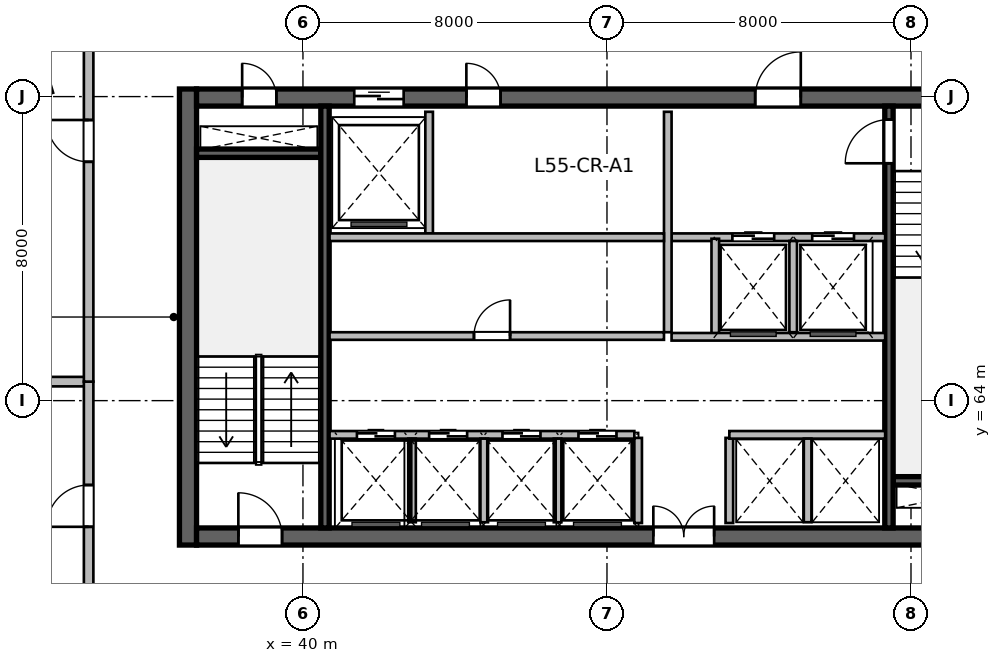
"""IFC4 building model, lengths in metres.
Left out: names, types, materials, properties, quantities, classifications, styles, units other than length and angle.
Written with IfcOpenShell. Run it as: python <this file> out.ifc"""

import sys

from ifc_helpers import new_model, si_unit, direction, frame, frame_2d, origin, place, context, subcontext, project, spatial, rectangle, extrude, source, transform, mapped, element, fill, save


model = new_model("IFC4")
c1 = context("Model", 3, precision=1e-05, world=origin(), true_north=direction((0.0, 1.0)))
c2 = subcontext(c1, "Body", "Model", "MODEL_VIEW")
j1 = project(units=[si_unit("LENGTHUNIT", "METRE"), si_unit("PLANEANGLEUNIT", "RADIAN")], contexts=[c1])
p1 = place(None, origin())
s1 = spatial("IfcSite", under=j1, at=p1, CompositionType="ELEMENT")
p2 = place(p1, origin())
s2 = spatial("IfcBuilding", under=s1, at=p2, CompositionType="ELEMENT")
p3 = place(p2, frame((0.0, 0.0, 227.4)))
s3 = spatial("IfcBuildingStorey", under=s2, at=p3, CompositionType="ELEMENT", Elevation=227.4)
m1 = source(origin(), c2, "Body", "SweptSolid", [
    extrude(rectangle(XDim=12.0, YDim=0.45, at=frame_2d((6.0, 0.0))), origin(), (0.0, 0.0, 1.0), 3.9),
])
p4 = place(p3, frame((36.975, 60.2, 0.0), z_axis=(0.0, 0.0, 1.0), x_axis=(0.0, 1.0, 0.0)))
e1 = element("IfcWall", 1, at=p4, inside=s3, PredefinedType="SHEAR", context=c2, shape_type="MappedRepresentation", body=[
    mapped(m1, transform((0.0, 0.0, 0.0), scale=1.0)),
])
m2 = source(origin(), c2, "Body", "SweptSolid", [
    extrude(rectangle(XDim=21.6, YDim=0.45, at=frame_2d((10.8, 0.0))), origin(), (0.0, 0.0, 1.0), 3.9),
])
p5 = place(p3, frame((37.2, 60.425, 0.0), z_axis=(0.0, 0.0, 1.0), x_axis=(1.0, 0.0, 0.0)))
e2 = element("IfcWall", 2, at=p5, inside=s3, PredefinedType="SHEAR", context=c2, shape_type="MappedRepresentation", body=[
    mapped(m2, transform((0.0, 0.0, 0.0), scale=1.0)),
])
p6 = place(p5, frame((1.1, 0.0, 0.0)))
e3 = element("IfcOpeningElement", 3, at=p6, cuts=e2, PredefinedType="OPENING", context=c2, shape_type="SweptSolid", body=[
    extrude(rectangle(XDim=1.15, YDim=2.15, at=frame_2d((0.575, 1.075))), frame((0.0, 0.235, 0.0), z_axis=(0.0, -1.0, 0.0), x_axis=(1.0, 0.0, 0.0)), (0.0, 0.0, 1.0), 0.47),
])
p7 = place(p5, frame((19.5, 0.0, 0.0)))
e4 = element("IfcOpeningElement", 4, at=p7, cuts=e2, PredefinedType="OPENING", context=c2, shape_type="SweptSolid", body=[
    extrude(rectangle(XDim=0.9, YDim=2.1, at=frame_2d((0.45, 1.05))), frame((0.0, 0.235, 0.0), z_axis=(0.0, -1.0, 0.0), x_axis=(1.0, 0.0, 0.0)), (0.0, 0.0, 1.0), 0.47),
])
p8 = place(p5, frame((12.02, 0.0, 0.0)))
e5 = element("IfcOpeningElement", 5, at=p8, cuts=e2, PredefinedType="OPENING", context=c2, shape_type="SweptSolid", body=[
    extrude(rectangle(XDim=1.6, YDim=2.15, at=frame_2d((0.8, 1.075))), frame((0.0, 0.235, 0.0), z_axis=(0.0, -1.0, 0.0), x_axis=(1.0, 0.0, 0.0)), (0.0, 0.0, 1.0), 0.47),
])
p9 = place(p3, frame((37.2, 71.975, 0.0), z_axis=(0.0, 0.0, 1.0), x_axis=(1.0, 0.0, 0.0)))
e6 = element("IfcWall", 6, at=p9, inside=s3, PredefinedType="SHEAR", context=c2, shape_type="MappedRepresentation", body=[
    mapped(m2, transform((0.0, 0.0, 0.0), scale=1.0)),
])
p10 = place(p9, frame((1.2, 0.0, 0.0)))
e7 = element("IfcOpeningElement", 7, at=p10, cuts=e6, PredefinedType="OPENING", context=c2, shape_type="SweptSolid", body=[
    extrude(rectangle(XDim=0.9, YDim=2.1, at=frame_2d((0.45, 1.05))), frame((0.0, 0.235, 0.0), z_axis=(0.0, -1.0, 0.0), x_axis=(1.0, 0.0, 0.0)), (0.0, 0.0, 1.0), 0.47),
])
p11 = place(p9, frame((14.7, 0.0, 0.0)))
e8 = element("IfcOpeningElement", 8, at=p11, cuts=e6, PredefinedType="OPENING", context=c2, shape_type="SweptSolid", body=[
    extrude(rectangle(XDim=1.2, YDim=2.15, at=frame_2d((0.6, 1.075))), frame((0.0, 0.235, 0.0), z_axis=(0.0, -1.0, 0.0), x_axis=(1.0, 0.0, 0.0)), (0.0, 0.0, 1.0), 0.47),
])
p12 = place(p9, frame((4.15, 0.0, 0.0)))
e9 = element("IfcOpeningElement", 9, at=p12, cuts=e6, PredefinedType="OPENING", context=c2, shape_type="SweptSolid", body=[
    extrude(rectangle(XDim=1.3, YDim=2.15, at=frame_2d((0.65, 1.075))), frame((0.0, 0.235, 0.0), z_axis=(0.0, -1.0, 0.0), x_axis=(1.0, 0.0, 0.0)), (0.0, 0.0, 1.0), 0.47),
])
p13 = place(p9, frame((7.1, 0.0, 0.0)))
e10 = element("IfcOpeningElement", 10, at=p13, cuts=e6, PredefinedType="OPENING", context=c2, shape_type="SweptSolid", body=[
    extrude(rectangle(XDim=0.9, YDim=2.1, at=frame_2d((0.45, 1.05))), frame((0.0, 0.235, 0.0), z_axis=(0.0, -1.0, 0.0), x_axis=(1.0, 0.0, 0.0)), (0.0, 0.0, 1.0), 0.47),
])
m3 = source(origin(), c2, "Body", "SweptSolid", [
    extrude(rectangle(XDim=3.27, YDim=0.22, at=frame_2d((1.635, 0.0))), origin(), (0.0, 0.0, 1.0), 3.9),
])
for number, where, z_axis, x_axis in (
    (11, (37.2, 70.51, 0.0), (0.0, 0.0, 1.0), (1.0, 0.0, 0.0)),
    (12, (55.53, 61.89, 0.0), (0.0, 0.0, 1.0), (1.0, 0.0, 0.0)),
):
    element("IfcWall", number, at=place(p3, frame(where, z_axis=z_axis, x_axis=x_axis)), inside=s3, PredefinedType="SHEAR", context=c2, shape_type="MappedRepresentation", body=[
        mapped(m3, transform((0.0, 0.0, 0.0), scale=1.0)),
    ])
m4 = source(origin(), c2, "Body", "SweptSolid", [
    extrude(rectangle(XDim=11.1, YDim=0.22, at=frame_2d((5.55, 0.0))), origin(), (0.0, 0.0, 1.0), 3.9),
])
p14 = place(p3, frame((40.58, 60.65, 0.0), z_axis=(0.0, 0.0, 1.0), x_axis=(0.0, 1.0, 0.0)))
e13 = element("IfcWall", 13, at=p14, inside=s3, PredefinedType="SHEAR", context=c2, shape_type="MappedRepresentation", body=[
    mapped(m4, transform((0.0, 0.0, 0.0), scale=1.0)),
])
p15 = place(p3, frame((55.42, 60.65, 0.0), z_axis=(0.0, 0.0, 1.0), x_axis=(0.0, 1.0, 0.0)))
e14 = element("IfcWall", 14, at=p15, inside=s3, PredefinedType="SHEAR", context=c2, shape_type="MappedRepresentation", body=[
    mapped(m4, transform((0.0, 0.0, 0.0), scale=1.0)),
])
p16 = place(p15, frame((9.595, 0.0, 0.0)))
e15 = element("IfcOpeningElement", 15, at=p16, cuts=e14, PredefinedType="OPENING", context=c2, shape_type="SweptSolid", body=[
    extrude(rectangle(XDim=1.15, YDim=2.15, at=frame_2d((0.575, 1.075))), frame((0.0, 0.12, 0.0), z_axis=(0.0, -1.0, 0.0), x_axis=(1.0, 0.0, 0.0)), (0.0, 0.0, 1.0), 0.24),
])
m5 = source(origin(), c2, "Body", "SweptSolid", [
    extrude(rectangle(XDim=2.24, YDim=0.2, at=frame_2d((1.12, 0.0))), origin(), (0.0, 0.0, 1.0), 3.65),
])
for number, where, z_axis, x_axis in (
    (16, (48.82, 60.78, 0.0), (0.0, 0.0, 1.0), (0.0, 1.0, 0.0)),
    (17, (51.22, 60.78, 0.0), (0.0, 0.0, 1.0), (0.0, 1.0, 0.0)),
):
    element("IfcWall", number, at=place(p3, frame(where, z_axis=z_axis, x_axis=x_axis)), inside=s3, PredefinedType="SOLIDWALL", context=c2, shape_type="MappedRepresentation", body=[
        mapped(m5, transform((0.0, 0.0, 0.0), scale=1.0)),
    ])
m6 = source(origin(), c2, "Body", "SweptSolid", [
    extrude(rectangle(XDim=5.62, YDim=0.2, at=frame_2d((2.81, 0.0))), origin(), (0.0, 0.0, 1.0), 3.65),
])
p17 = place(p3, frame((49.7, 68.3, 0.0), z_axis=(0.0, 0.0, 1.0), x_axis=(1.0, 0.0, 0.0)))
e18 = element("IfcWall", 18, at=p17, inside=s3, PredefinedType="SOLIDWALL", context=c2, shape_type="MappedRepresentation", body=[
    mapped(m6, transform((0.0, 0.0, 0.0), scale=1.0)),
])
p18 = place(p17, frame((1.6, 0.0, 0.0)))
e19 = element("IfcOpeningElement", 19, at=p18, cuts=e18, PredefinedType="OPENING", context=c2, shape_type="SweptSolid", body=[
    extrude(rectangle(XDim=1.1, YDim=2.15, at=frame_2d((0.55, 1.075))), frame((0.0, 0.11, 0.0), z_axis=(0.0, -1.0, 0.0), x_axis=(1.0, 0.0, 0.0)), (0.0, 0.0, 1.0), 0.22),
])
p19 = place(p17, frame((3.7, 0.0, 0.0)))
e20 = element("IfcOpeningElement", 20, at=p19, cuts=e18, PredefinedType="OPENING", context=c2, shape_type="SweptSolid", body=[
    extrude(rectangle(XDim=1.1, YDim=2.15, at=frame_2d((0.55, 1.075))), frame((0.0, 0.11, 0.0), z_axis=(0.0, -1.0, 0.0), x_axis=(1.0, 0.0, 0.0)), (0.0, 0.0, 1.0), 0.22),
])
m7 = source(origin(), c2, "Body", "SweptSolid", [
    extrude(rectangle(XDim=5.8, YDim=0.2, at=frame_2d((2.9, 0.0))), origin(), (0.0, 0.0, 1.0), 3.65),
])
p20 = place(p3, frame((49.6, 65.8, 0.0), z_axis=(0.0, 0.0, 1.0), x_axis=(0.0, 1.0, 0.0)))
e21 = element("IfcWall", 21, at=p20, inside=s3, PredefinedType="SOLIDWALL", context=c2, shape_type="MappedRepresentation", body=[
    mapped(m7, transform((0.0, 0.0, 0.0), scale=1.0)),
])
m8 = source(origin(), c2, "Body", "SweptSolid", [
    extrude(rectangle(XDim=2.58, YDim=0.2, at=frame_2d((1.29, 0.0))), origin(), (0.0, 0.0, 1.0), 3.65),
])
p21 = place(p3, frame((50.85, 65.68, 0.0), z_axis=(0.0, 0.0, 1.0), x_axis=(0.0, 1.0, 0.0)))
e22 = element("IfcWall", 22, at=p21, inside=s3, PredefinedType="SOLIDWALL", context=c2, shape_type="MappedRepresentation", body=[
    mapped(m8, transform((0.0, 0.0, 0.0), scale=1.0)),
])
m9 = source(origin(), c2, "Body", "SweptSolid", [
    extrude(rectangle(XDim=2.4, YDim=0.2, at=frame_2d((1.2, 0.0))), origin(), (0.0, 0.0, 1.0), 3.65),
])
p22 = place(p3, frame((52.9, 65.8, 0.0), z_axis=(0.0, 0.0, 1.0), x_axis=(0.0, 1.0, 0.0)))
e23 = element("IfcWall", 23, at=p22, inside=s3, PredefinedType="SOLIDWALL", context=c2, shape_type="MappedRepresentation", body=[
    mapped(m9, transform((0.0, 0.0, 0.0), scale=1.0)),
])
p23 = place(p3, frame((49.7, 65.68, 0.0), z_axis=(0.0, 0.0, 1.0), x_axis=(1.0, 0.0, 0.0)))
e24 = element("IfcWall", 24, at=p23, inside=s3, PredefinedType="SOLIDWALL", context=c2, shape_type="MappedRepresentation", body=[
    mapped(m6, transform((0.0, 0.0, 0.0), scale=1.0)),
])
m10 = source(origin(), c2, "Body", "SweptSolid", [
    extrude(rectangle(XDim=3.2, YDim=0.2, at=frame_2d((1.6, 0.0))), origin(), (0.0, 0.0, 1.0), 3.65),
])
p24 = place(p3, frame((43.32, 68.4, 0.0), z_axis=(0.0, 0.0, 1.0), x_axis=(0.0, 1.0, 0.0)))
e25 = element("IfcWall", 25, at=p24, inside=s3, PredefinedType="SOLIDWALL", context=c2, shape_type="MappedRepresentation", body=[
    mapped(m10, transform((0.0, 0.0, 0.0), scale=1.0)),
])
m11 = source(origin(), c2, "Body", "SweptSolid", [
    extrude(rectangle(XDim=8.8, YDim=0.2, at=frame_2d((4.4, 0.0))), origin(), (0.0, 0.0, 1.0), 3.65),
])
p25 = place(p3, frame((40.7, 68.3, 0.0), z_axis=(0.0, 0.0, 1.0), x_axis=(1.0, 0.0, 0.0)))
e26 = element("IfcWall", 26, at=p25, inside=s3, PredefinedType="SOLIDWALL", context=c2, shape_type="MappedRepresentation", body=[
    mapped(m11, transform((0.0, 0.0, 0.0), scale=1.0)),
])
m12 = source(origin(), c2, "Body", "SweptSolid", [
    extrude(rectangle(XDim=8.02, YDim=0.2, at=frame_2d((4.01, 0.0))), origin(), (0.0, 0.0, 1.0), 3.65),
])
p26 = place(p3, frame((40.7, 63.1, 0.0), z_axis=(0.0, 0.0, 1.0), x_axis=(1.0, 0.0, 0.0)))
e27 = element("IfcWall", 27, at=p26, inside=s3, PredefinedType="SOLIDWALL", context=c2, shape_type="MappedRepresentation", body=[
    mapped(m12, transform((0.0, 0.0, 0.0), scale=1.0)),
])
p27 = place(p26, frame((0.72, 0.0, 0.0)))
e28 = element("IfcOpeningElement", 28, at=p27, cuts=e27, PredefinedType="OPENING", context=c2, shape_type="SweptSolid", body=[
    extrude(rectangle(XDim=1.0, YDim=2.15, at=frame_2d((0.5, 1.075))), frame((0.0, 0.11, 0.0), z_axis=(0.0, -1.0, 0.0), x_axis=(1.0, 0.0, 0.0)), (0.0, 0.0, 1.0), 0.22),
])
p28 = place(p26, frame((2.62, 0.0, 0.0)))
e29 = element("IfcOpeningElement", 29, at=p28, cuts=e27, PredefinedType="OPENING", context=c2, shape_type="SweptSolid", body=[
    extrude(rectangle(XDim=1.0, YDim=2.15, at=frame_2d((0.5, 1.075))), frame((0.0, 0.11, 0.0), z_axis=(0.0, -1.0, 0.0), x_axis=(1.0, 0.0, 0.0)), (0.0, 0.0, 1.0), 0.22),
])
p29 = place(p26, frame((4.55, 0.0, 0.0)))
e30 = element("IfcOpeningElement", 30, at=p29, cuts=e27, PredefinedType="OPENING", context=c2, shape_type="SweptSolid", body=[
    extrude(rectangle(XDim=1.0, YDim=2.15, at=frame_2d((0.5, 1.075))), frame((0.0, 0.11, 0.0), z_axis=(0.0, -1.0, 0.0), x_axis=(1.0, 0.0, 0.0)), (0.0, 0.0, 1.0), 0.22),
])
p30 = place(p26, frame((6.55, 0.0, 0.0)))
e31 = element("IfcOpeningElement", 31, at=p30, cuts=e27, PredefinedType="OPENING", context=c2, shape_type="SweptSolid", body=[
    extrude(rectangle(XDim=1.0, YDim=2.15, at=frame_2d((0.5, 1.075))), frame((0.0, 0.11, 0.0), z_axis=(0.0, -1.0, 0.0), x_axis=(1.0, 0.0, 0.0)), (0.0, 0.0, 1.0), 0.22),
])
m13 = source(origin(), c2, "Body", "SweptSolid", [
    extrude(rectangle(XDim=4.1, YDim=0.2, at=frame_2d((2.05, 0.0))), origin(), (0.0, 0.0, 1.0), 3.65),
])
p31 = place(p3, frame((51.22, 63.1, 0.0), z_axis=(0.0, 0.0, 1.0), x_axis=(1.0, 0.0, 0.0)))
e32 = element("IfcWall", 32, at=p31, inside=s3, PredefinedType="SOLIDWALL", context=c2, shape_type="MappedRepresentation", body=[
    mapped(m13, transform((0.0, 0.0, 0.0), scale=1.0)),
])
m14 = source(origin(), c2, "Body", "SweptSolid", [
    extrude(rectangle(XDim=2.2, YDim=0.2, at=frame_2d((1.1, 0.0))), origin(), (0.0, 0.0, 1.0), 3.65),
])
for number, where, z_axis, x_axis in (
    (33, (42.87, 60.8, 0.0), (0.0, 0.0, 1.0), (0.0, 1.0, 0.0)),
    (34, (44.77, 60.8, 0.0), (0.0, 0.0, 1.0), (0.0, 1.0, 0.0)),
    (35, (46.7, 60.8, 0.0), (0.0, 0.0, 1.0), (0.0, 1.0, 0.0)),
    (36, (53.28, 60.8, 0.0), (0.0, 0.0, 1.0), (0.0, 1.0, 0.0)),
):
    element("IfcWall", number, at=place(p3, frame(where, z_axis=z_axis, x_axis=x_axis)), inside=s3, PredefinedType="SOLIDWALL", context=c2, shape_type="MappedRepresentation", body=[
        mapped(m14, transform((0.0, 0.0, 0.0), scale=1.0)),
    ])
p32 = place(p3, frame((40.7, 65.7, 0.0), z_axis=(0.0, 0.0, 1.0), x_axis=(1.0, 0.0, 0.0)))
e37 = element("IfcWall", 37, at=p32, inside=s3, PredefinedType="SOLIDWALL", context=c2, shape_type="MappedRepresentation", body=[
    mapped(m11, transform((0.0, 0.0, 0.0), scale=1.0)),
])
p33 = place(p32, frame((3.8, 0.0, 0.0)))
e38 = element("IfcOpeningElement", 38, at=p33, cuts=e37, PredefinedType="OPENING", context=c2, shape_type="SweptSolid", body=[
    extrude(rectangle(XDim=0.95, YDim=2.15, at=frame_2d((0.475, 1.075))), frame((0.0, 0.11, 0.0), z_axis=(0.0, -1.0, 0.0), x_axis=(1.0, 0.0, 0.0)), (0.0, 0.0, 1.0), 0.22),
])
m15 = source(origin(), c2, "Body", "SweptSolid", [
    extrude(rectangle(XDim=15.882, YDim=0.25, at=frame_2d((7.941, 0.0))), origin(), (0.0, 0.0, 1.0), 3.65),
])
p34 = place(p3, frame((18.478, 64.5, 0.0), z_axis=(0.0, 0.0, 1.0), x_axis=(1.0, 0.0, 0.0)))
e39 = element("IfcWall", 39, at=p34, inside=s3, PredefinedType="PARTITIONING", context=c2, shape_type="MappedRepresentation", body=[
    mapped(m15, transform((0.0, 0.0, 0.0), scale=1.0)),
])
m16 = source(origin(), c2, "Body", "SweptSolid", [
    extrude(rectangle(XDim=6.54, YDim=0.25, at=frame_2d((3.27, 0.0))), origin(), (0.0, 0.0, 1.0), 3.65),
])
p35 = place(p3, frame((34.36, 57.96, 0.0), z_axis=(0.0, 0.0, 1.0), x_axis=(0.0, 1.0, 0.0)))
e40 = element("IfcWall", 40, at=p35, inside=s3, PredefinedType="PARTITIONING", context=c2, shape_type="MappedRepresentation", body=[
    mapped(m16, transform((0.0, 0.0, 0.0), scale=1.0)),
])
p36 = place(p35, frame((2.72, 0.0, 0.0)))
e41 = element("IfcOpeningElement", 41, at=p36, cuts=e40, PredefinedType="OPENING", context=c2, shape_type="SweptSolid", body=[
    extrude(rectangle(XDim=1.1, YDim=2.15, at=frame_2d((0.55, 1.075))), frame((0.0, 0.135, 0.0), z_axis=(0.0, -1.0, 0.0), x_axis=(1.0, 0.0, 0.0)), (0.0, 0.0, 1.0), 0.27),
])
m17 = source(origin(), c2, "Body", "SweptSolid", [
    extrude(rectangle(XDim=12.669, YDim=0.25, at=frame_2d((6.334, 0.0))), origin(), (0.0, 0.0, 1.0), 3.65),
])
p37 = place(p3, frame((34.36, 64.5, 0.0), z_axis=(0.0, 0.0, 1.0), x_axis=(0.0, 1.0, 0.0)))
e42 = element("IfcWall", 42, at=p37, inside=s3, PredefinedType="PARTITIONING", context=c2, shape_type="MappedRepresentation", body=[
    mapped(m17, transform((0.0, 0.0, 0.0), scale=1.0)),
])
p38 = place(p37, frame((5.784, 0.0, 0.0)))
e43 = element("IfcOpeningElement", 43, at=p38, cuts=e42, PredefinedType="OPENING", context=c2, shape_type="SweptSolid", body=[
    extrude(rectangle(XDim=1.1, YDim=2.15, at=frame_2d((0.55, 1.075))), frame((0.0, 0.135, 0.0), z_axis=(0.0, -1.0, 0.0), x_axis=(1.0, 0.0, 0.0)), (0.0, 0.0, 1.0), 0.27),
])
m18 = source(origin(), c2, "Body", "SweptSolid", [
    extrude(rectangle(XDim=1.15, YDim=2.15, at=frame_2d((0.575, 1.075))), frame((0.0, 0.025, 0.0), z_axis=(0.0, -1.0, 0.0), x_axis=(1.0, 0.0, 0.0)), (0.0, 0.0, 1.0), 0.05),
])
p39 = place(p6, origin())
e44 = element("IfcDoor", 44, at=p39, inside=s3, OperationType="SINGLE_SWING_LEFT", PredefinedType="DOOR", context=c2, shape_type="MappedRepresentation", body=[
    mapped(m18, transform((0.0, 0.0, 0.0), scale=1.0)),
])
fill(e3, e44)
m19 = source(origin(), c2, "Body", "SweptSolid", [
    extrude(rectangle(XDim=0.9, YDim=2.1, at=frame_2d((0.45, 1.05))), frame((0.0, 0.025, 0.0), z_axis=(0.0, -1.0, 0.0), x_axis=(1.0, 0.0, 0.0)), (0.0, 0.0, 1.0), 0.05),
])
p40 = place(p10, origin())
e45 = element("IfcDoor", 45, at=p40, inside=s3, OperationType="SINGLE_SWING_LEFT", PredefinedType="DOOR", context=c2, shape_type="MappedRepresentation", body=[
    mapped(m19, transform((0.0, 0.0, 0.0), scale=1.0)),
])
fill(e7, e45)
p41 = place(p16, origin())
e46 = element("IfcDoor", 46, at=p41, inside=s3, OperationType="SINGLE_SWING_LEFT", PredefinedType="DOOR", context=c2, shape_type="MappedRepresentation", body=[
    mapped(m18, transform((0.0, 0.0, 0.0), scale=1.0)),
])
fill(e15, e46)
m20 = source(origin(), c2, "Body", "SweptSolid", [
    extrude(rectangle(XDim=1.6, YDim=2.15, at=frame_2d((0.8, 1.075))), frame((0.0, 0.025, 0.0), z_axis=(0.0, -1.0, 0.0), x_axis=(1.0, 0.0, 0.0)), (0.0, 0.0, 1.0), 0.05),
])
p42 = place(p8, origin())
e47 = element("IfcDoor", 47, at=p42, inside=s3, OperationType="DOUBLE_DOOR_SINGLE_SWING", PredefinedType="DOOR", context=c2, shape_type="MappedRepresentation", body=[
    mapped(m20, transform((0.0, 0.0, 0.0), scale=1.0)),
])
fill(e5, e47)
m21 = source(origin(), c2, "Body", "SweptSolid", [
    extrude(rectangle(XDim=1.2, YDim=2.15, at=frame_2d((0.6, 1.075))), frame((0.0, 0.025, 0.0), z_axis=(0.0, -1.0, 0.0), x_axis=(1.0, 0.0, 0.0)), (0.0, 0.0, 1.0), 0.05),
])
p43 = place(p11, origin())
e48 = element("IfcDoor", 48, at=p43, inside=s3, OperationType="SINGLE_SWING_RIGHT", PredefinedType="DOOR", context=c2, shape_type="MappedRepresentation", body=[
    mapped(m21, transform((0.0, 0.0, 0.0), scale=1.0)),
])
fill(e8, e48)
m22 = source(origin(), c2, "Body", "SweptSolid", [
    extrude(rectangle(XDim=1.1, YDim=2.15, at=frame_2d((0.55, 1.075))), frame((0.0, 0.025, 0.0), z_axis=(0.0, -1.0, 0.0), x_axis=(1.0, 0.0, 0.0)), (0.0, 0.0, 1.0), 0.05),
])
p44 = place(p18, origin())
e49 = element("IfcDoor", 49, at=p44, inside=s3, OperationType="DOUBLE_DOOR_SLIDING", PredefinedType="DOOR", context=c2, shape_type="MappedRepresentation", body=[
    mapped(m22, transform((0.0, 0.0, 0.0), scale=1.0)),
])
fill(e19, e49)
p45 = place(p19, origin())
e50 = element("IfcDoor", 50, at=p45, inside=s3, OperationType="DOUBLE_DOOR_SLIDING", PredefinedType="DOOR", context=c2, shape_type="MappedRepresentation", body=[
    mapped(m22, transform((0.0, 0.0, 0.0), scale=1.0)),
])
fill(e20, e50)
m23 = source(origin(), c2, "Body", "SweptSolid", [
    extrude(rectangle(XDim=1.3, YDim=2.15, at=frame_2d((0.65, 1.075))), frame((0.0, 0.025, 0.0), z_axis=(0.0, -1.0, 0.0), x_axis=(1.0, 0.0, 0.0)), (0.0, 0.0, 1.0), 0.05),
])
p46 = place(p12, origin())
e51 = element("IfcDoor", 51, at=p46, inside=s3, OperationType="DOUBLE_DOOR_SLIDING", PredefinedType="DOOR", context=c2, shape_type="MappedRepresentation", body=[
    mapped(m23, transform((0.0, 0.0, 0.0), scale=1.0)),
])
fill(e9, e51)
p47 = place(p13, origin())
e52 = element("IfcDoor", 52, at=p47, inside=s3, OperationType="SINGLE_SWING_LEFT", PredefinedType="DOOR", context=c2, shape_type="MappedRepresentation", body=[
    mapped(m19, transform((0.0, 0.0, 0.0), scale=1.0)),
])
fill(e10, e52)
m24 = source(origin(), c2, "Body", "SweptSolid", [
    extrude(rectangle(XDim=1.0, YDim=2.15, at=frame_2d((0.5, 1.075))), frame((0.0, 0.025, 0.0), z_axis=(0.0, -1.0, 0.0), x_axis=(1.0, 0.0, 0.0)), (0.0, 0.0, 1.0), 0.05),
])
p48 = place(p27, origin())
e53 = element("IfcDoor", 53, at=p48, inside=s3, OperationType="DOUBLE_DOOR_SLIDING", PredefinedType="DOOR", context=c2, shape_type="MappedRepresentation", body=[
    mapped(m24, transform((0.0, 0.0, 0.0), scale=1.0)),
])
fill(e28, e53)
p49 = place(p28, origin())
e54 = element("IfcDoor", 54, at=p49, inside=s3, OperationType="DOUBLE_DOOR_SLIDING", PredefinedType="DOOR", context=c2, shape_type="MappedRepresentation", body=[
    mapped(m24, transform((0.0, 0.0, 0.0), scale=1.0)),
])
fill(e29, e54)
p50 = place(p29, origin())
e55 = element("IfcDoor", 55, at=p50, inside=s3, OperationType="DOUBLE_DOOR_SLIDING", PredefinedType="DOOR", context=c2, shape_type="MappedRepresentation", body=[
    mapped(m24, transform((0.0, 0.0, 0.0), scale=1.0)),
])
fill(e30, e55)
p51 = place(p30, origin())
e56 = element("IfcDoor", 56, at=p51, inside=s3, OperationType="DOUBLE_DOOR_SLIDING", PredefinedType="DOOR", context=c2, shape_type="MappedRepresentation", body=[
    mapped(m24, transform((0.0, 0.0, 0.0), scale=1.0)),
])
fill(e31, e56)
m25 = source(origin(), c2, "Body", "SweptSolid", [
    extrude(rectangle(XDim=0.95, YDim=2.15, at=frame_2d((0.475, 1.075))), frame((0.0, 0.025, 0.0), z_axis=(0.0, -1.0, 0.0), x_axis=(1.0, 0.0, 0.0)), (0.0, 0.0, 1.0), 0.05),
])
p52 = place(p33, origin())
e57 = element("IfcDoor", 57, at=p52, inside=s3, OperationType="SINGLE_SWING_RIGHT", PredefinedType="DOOR", context=c2, shape_type="MappedRepresentation", body=[
    mapped(m25, transform((0.0, 0.0, 0.0), scale=1.0)),
])
fill(e38, e57)
m26 = source(origin(), c2, "Body", "SweptSolid", [
    extrude(rectangle(XDim=1.1, YDim=2.15, at=frame_2d((0.55, 1.075))), frame((0.0, 0.025, 0.0), z_axis=(0.0, -1.0, 0.0), x_axis=(1.0, 0.0, 0.0)), (0.0, 0.0, 1.0), 0.05),
])
p53 = place(p36, origin())
e58 = element("IfcDoor", 58, at=p53, inside=s3, OperationType="SINGLE_SWING_LEFT", PredefinedType="DOOR", context=c2, shape_type="MappedRepresentation", body=[
    mapped(m26, transform((0.0, 0.0, 0.0), scale=1.0)),
])
fill(e41, e58)
p54 = place(p38, origin())
e59 = element("IfcDoor", 59, at=p54, inside=s3, OperationType="SINGLE_SWING_RIGHT", PredefinedType="DOOR", context=c2, shape_type="MappedRepresentation", body=[
    mapped(m26, transform((0.0, 0.0, 0.0), scale=1.0)),
])
fill(e43, e59)
save(model, sys.argv[1])
